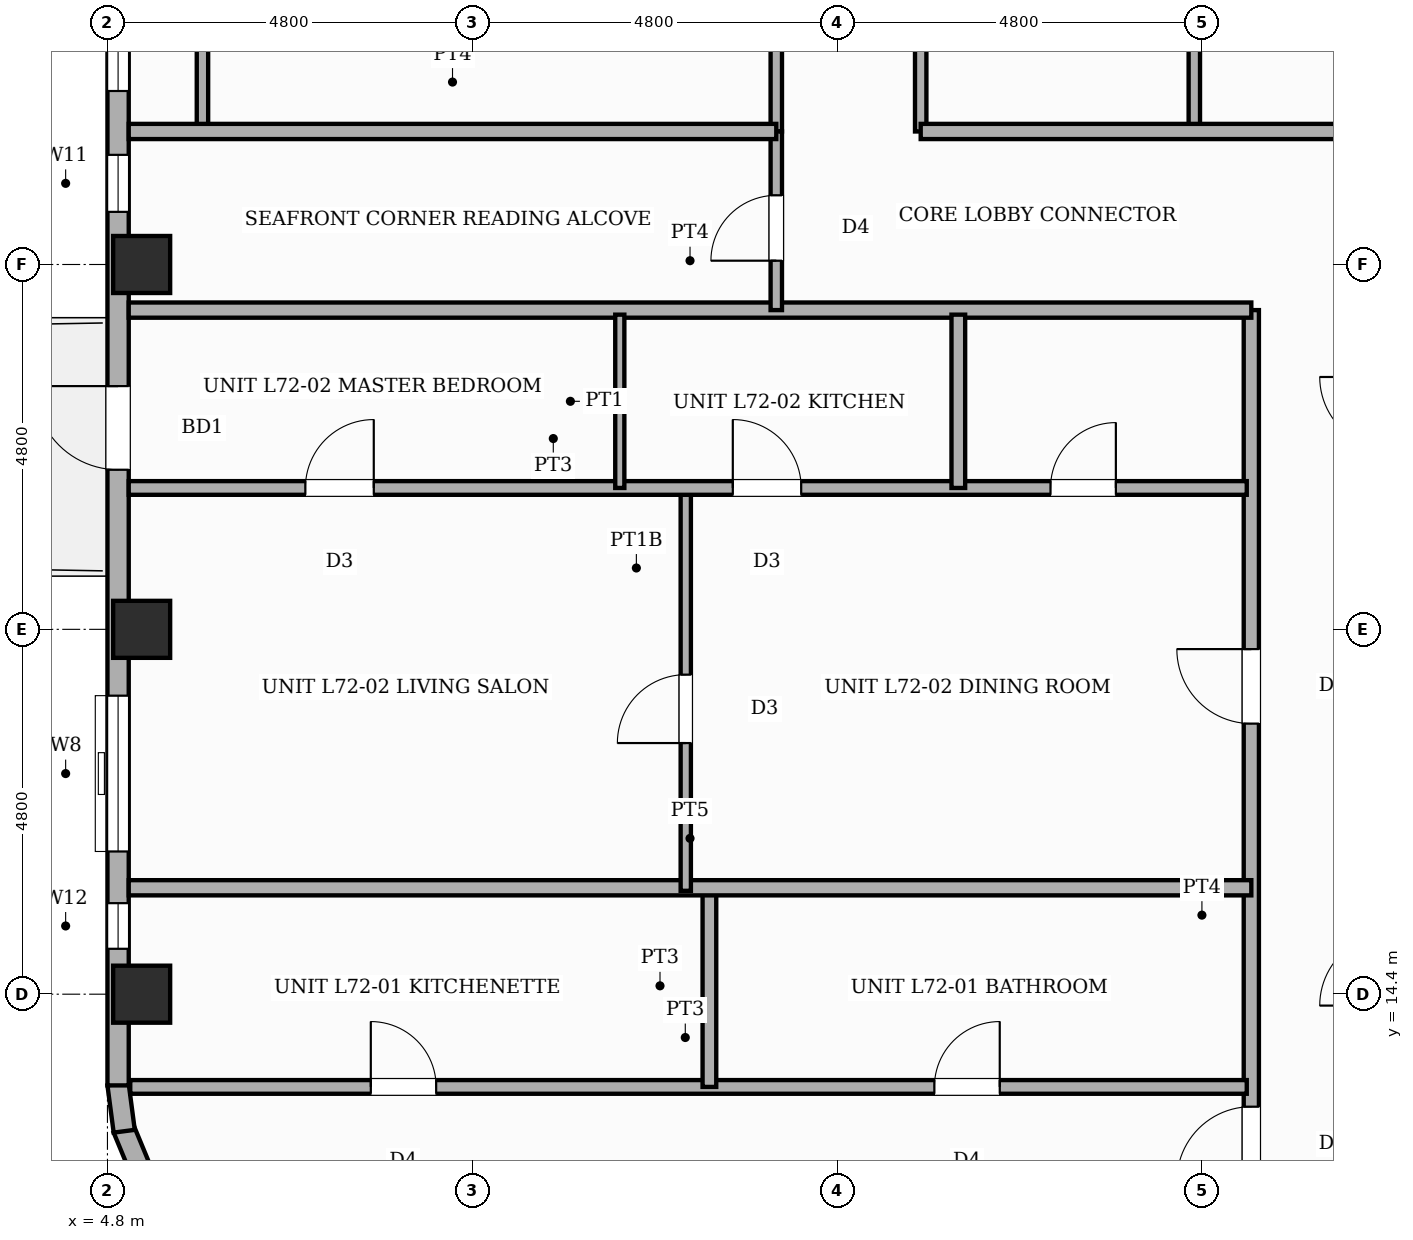
"""IFC4 building model, lengths in metres.
Left out: names, types, materials, properties, quantities, classifications, styles, units other than length and angle.
Written with IfcOpenShell. Run it as: python <this file> out.ifc"""

import sys

from ifc_helpers import new_model, si_unit, direction, frame, frame_2d, origin, origin_2d, place, context, subcontext, project, spatial, rectangle, extrude, element, fill, save


model = new_model("IFC4")
c1 = context("Model", 3, precision=1e-05, world=origin(), true_north=direction((0.0, 1.0)))
c2 = subcontext(c1, "Body", "Model", "MODEL_VIEW")
j1 = project(units=[si_unit("LENGTHUNIT", "METRE"), si_unit("PLANEANGLEUNIT", "RADIAN")], contexts=[c1])
p1 = place(None, origin())
s1 = spatial("IfcSite", under=j1, at=p1, CompositionType="ELEMENT")
p2 = place(p1, origin())
s2 = spatial("IfcBuilding", under=s1, at=p2, CompositionType="ELEMENT")
p3 = place(p2, frame((0.0, 0.0, 278.5)))
s3 = spatial("IfcBuildingStorey", under=s2, at=p3, CompositionType="ELEMENT", Elevation=278.5)
for number, where, z_axis, x_axis in (
    (1, (5.25, 14.4, 0.0), (0.0, 0.0, 1.0), (1.0, 0.0, 0.0)),
    (2, (5.25, 19.2, 0.0), (0.0, 0.0, 1.0), (1.0, 0.0, 0.0)),
    (3, (5.25, 24.0, 0.0), (0.0, 0.0, 1.0), (1.0, 0.0, 0.0)),
):
    element("IfcColumn", number, at=place(p3, frame(where, z_axis=z_axis, x_axis=x_axis)), inside=s3, PredefinedType="COLUMN", context=c2, shape_type="SweptSolid", body=[
        extrude(rectangle(XDim=0.75, YDim=0.75, at=origin_2d()), origin(), (0.0, 0.0, 1.0), 4.3),
    ])
p4 = place(p3, frame((5.251, 12.054, 0.0), z_axis=(0.0, 0.0, 1.0), x_axis=(-0.382787856107, 0.923836271867, 0.0)))
e4 = element("IfcWall", 4, at=p4, inside=s3, PredefinedType="STANDARD", context=c2, shape_type="SweptSolid", body=[
    extrude(rectangle(XDim=0.626, YDim=0.28, at=frame_2d((0.313, 0.0))), origin(), (0.0, 0.0, 1.0), 4.04),
])
p5 = place(p3, frame((5.021, 12.597, 0.0), z_axis=(0.0, 0.0, 1.0), x_axis=(-0.130555323746, 0.9914410257, 0.0)))
e5 = element("IfcWall", 5, at=p5, inside=s3, PredefinedType="STANDARD", context=c2, shape_type="SweptSolid", body=[
    extrude(rectangle(XDim=0.626, YDim=0.28, at=frame_2d((0.313, 0.0))), origin(), (0.0, 0.0, 1.0), 4.04),
])
p6 = place(p3, frame((4.94, 13.2, 0.0), z_axis=(0.0, 0.0, 1.0), x_axis=(0.0, 1.0, 0.0)))
e6 = element("IfcWall", 6, at=p6, inside=s3, PredefinedType="STANDARD", context=c2, shape_type="SweptSolid", body=[
    extrude(rectangle(XDim=32.4, YDim=0.28, at=frame_2d((16.2, 0.0))), origin(), (0.0, 0.0, 1.0), 3.32),
])
p7 = place(p6, frame((8.1, 0.0, 0.0)))
e7 = element("IfcOpeningElement", 7, at=p7, cuts=e6, PredefinedType="OPENING", context=c2, shape_type="SweptSolid", body=[
    extrude(rectangle(XDim=1.1, YDim=2.15, at=frame_2d((0.55, 1.075))), frame((0.0, 0.15, 0.0), z_axis=(0.0, -1.0, 0.0), x_axis=(1.0, 0.0, 0.0)), (0.0, 0.0, 1.0), 0.3),
])
p8 = place(p6, frame((1.798, 0.0, 0.45)))
e8 = element("IfcOpeningElement", 8, at=p8, cuts=e6, PredefinedType="OPENING", context=c2, shape_type="SweptSolid", body=[
    extrude(rectangle(XDim=0.6, YDim=1.8, at=frame_2d((0.3, 0.9))), frame((0.0, 0.15, 0.0), z_axis=(0.0, -1.0, 0.0), x_axis=(1.0, 0.0, 0.0)), (0.0, 0.0, 1.0), 0.3),
])
p9 = place(p6, frame((3.077, 0.0, 0.8)))
e9 = element("IfcOpeningElement", 9, at=p9, cuts=e6, PredefinedType="OPENING", context=c2, shape_type="SweptSolid", body=[
    extrude(rectangle(XDim=2.05, YDim=1.95, at=frame_2d((1.025, 0.975))), frame((0.0, 0.15, 0.0), z_axis=(0.0, -1.0, 0.0), x_axis=(1.0, 0.0, 0.0)), (0.0, 0.0, 1.0), 0.3),
])
p10 = place(p6, frame((13.083, 0.0, 0.8)))
e10 = element("IfcOpeningElement", 10, at=p10, cuts=e6, PredefinedType="OPENING", context=c2, shape_type="SweptSolid", body=[
    extrude(rectangle(XDim=2.05, YDim=1.95, at=frame_2d((1.025, 0.975))), frame((0.0, 0.15, 0.0), z_axis=(0.0, -1.0, 0.0), x_axis=(1.0, 0.0, 0.0)), (0.0, 0.0, 1.0), 0.3),
])
p11 = place(p6, frame((11.492, 0.0, 0.45)))
e11 = element("IfcOpeningElement", 11, at=p11, cuts=e6, PredefinedType="OPENING", context=c2, shape_type="SweptSolid", body=[
    extrude(rectangle(XDim=0.75, YDim=1.8, at=frame_2d((0.375, 0.9))), frame((0.0, 0.15, 0.0), z_axis=(0.0, -1.0, 0.0), x_axis=(1.0, 0.0, 0.0)), (0.0, 0.0, 1.0), 0.3),
])
p12 = place(p3, frame((13.6, 25.75, 0.0), z_axis=(0.0, 0.0, 1.0), x_axis=(0.0, 1.0, 0.0)))
e12 = element("IfcWall", 12, at=p12, inside=s3, PredefinedType="PARTITIONING", context=c2, shape_type="SweptSolid", body=[
    extrude(rectangle(XDim=5.15, YDim=0.15, at=frame_2d((2.575, 0.0))), origin(), (0.0, 0.0, 1.0), 4.04),
])
p13 = place(p12, frame((1.1, 0.0, 0.0)))
e13 = element("IfcOpeningElement", 13, at=p13, cuts=e12, PredefinedType="OPENING", context=c2, shape_type="SweptSolid", body=[
    extrude(rectangle(XDim=0.95, YDim=2.15, at=frame_2d((0.475, 1.075))), frame((0.0, 0.085, 0.0), z_axis=(0.0, -1.0, 0.0), x_axis=(1.0, 0.0, 0.0)), (0.0, 0.0, 1.0), 0.17),
])
p14 = place(p3, frame((15.5, 25.75, 0.0), z_axis=(0.0, 0.0, 1.0), x_axis=(0.0, 1.0, 0.0)))
e14 = element("IfcWall", 14, at=p14, inside=s3, PredefinedType="PARTITIONING", context=c2, shape_type="SweptSolid", body=[
    extrude(rectangle(XDim=5.15, YDim=0.15, at=frame_2d((2.575, 0.0))), origin(), (0.0, 0.0, 1.0), 4.04),
])
p15 = place(p14, frame((1.1, 0.0, 0.0)))
e15 = element("IfcOpeningElement", 15, at=p15, cuts=e14, PredefinedType="OPENING", context=c2, shape_type="SweptSolid", body=[
    extrude(rectangle(XDim=0.95, YDim=2.15, at=frame_2d((0.475, 1.075))), frame((0.0, 0.085, 0.0), z_axis=(0.0, -1.0, 0.0), x_axis=(1.0, 0.0, 0.0)), (0.0, 0.0, 1.0), 0.17),
])
p16 = place(p3, frame((6.05, 25.75, 0.0), z_axis=(0.0, 0.0, 1.0), x_axis=(0.0, 1.0, 0.0)))
e16 = element("IfcWall", 16, at=p16, inside=s3, PredefinedType="PARTITIONING", context=c2, shape_type="SweptSolid", body=[
    extrude(rectangle(XDim=5.15, YDim=0.15, at=frame_2d((2.575, 0.0))), origin(), (0.0, 0.0, 1.0), 4.04),
])
p17 = place(p3, frame((19.1, 25.75, 0.0), z_axis=(0.0, 0.0, 1.0), x_axis=(0.0, 1.0, 0.0)))
e17 = element("IfcWall", 17, at=p17, inside=s3, PredefinedType="PARTITIONING", context=c2, shape_type="SweptSolid", body=[
    extrude(rectangle(XDim=5.15, YDim=0.15, at=frame_2d((2.575, 0.0))), origin(), (0.0, 0.0, 1.0), 4.04),
])
p18 = place(p17, frame((1.2, 0.0, 0.0)))
e18 = element("IfcOpeningElement", 18, at=p18, cuts=e17, PredefinedType="OPENING", context=c2, shape_type="SweptSolid", body=[
    extrude(rectangle(XDim=0.95, YDim=2.15, at=frame_2d((0.475, 1.075))), frame((0.0, 0.085, 0.0), z_axis=(0.0, -1.0, 0.0), x_axis=(1.0, 0.0, 0.0)), (0.0, 0.0, 1.0), 0.17),
])
p19 = place(p3, frame((19.85, 11.08, 0.0), z_axis=(0.0, 0.0, 1.0), x_axis=(0.0, 1.0, 0.0)))
e19 = element("IfcWall", 19, at=p19, inside=s3, PredefinedType="PARTITIONING", context=c2, shape_type="SweptSolid", body=[
    extrude(rectangle(XDim=12.32, YDim=0.2, at=frame_2d((6.16, 0.0))), origin(), (0.0, 0.0, 1.0), 4.04),
])
p20 = place(p19, frame((0.86, 0.0, 0.0)))
e20 = element("IfcOpeningElement", 20, at=p20, cuts=e19, PredefinedType="OPENING", context=c2, shape_type="SweptSolid", body=[
    extrude(rectangle(XDim=0.98, YDim=2.18, at=frame_2d((0.49, 1.09))), frame((0.0, 0.11, 0.0), z_axis=(0.0, -1.0, 0.0), x_axis=(1.0, 0.0, 0.0)), (0.0, 0.0, 1.0), 0.22),
])
p21 = place(p19, frame((6.88, 0.0, 0.0)))
e21 = element("IfcOpeningElement", 21, at=p21, cuts=e19, PredefinedType="OPENING", context=c2, shape_type="SweptSolid", body=[
    extrude(rectangle(XDim=0.98, YDim=2.18, at=frame_2d((0.49, 1.09))), frame((0.0, 0.11, 0.0), z_axis=(0.0, -1.0, 0.0), x_axis=(1.0, 0.0, 0.0)), (0.0, 0.0, 1.0), 0.22),
])
p22 = place(p3, frame((5.08, 23.4, 0.0), z_axis=(0.0, 0.0, 1.0), x_axis=(1.0, 0.0, 0.0)))
e22 = element("IfcWall", 22, at=p22, inside=s3, PredefinedType="PARTITIONING", context=c2, shape_type="SweptSolid", body=[
    extrude(rectangle(XDim=14.77, YDim=0.2, at=frame_2d((7.385, 0.0))), origin(), (0.0, 0.0, 1.0), 4.04),
])
p23 = place(p3, frame((15.5, 25.75, 0.0), z_axis=(0.0, 0.0, 1.0), x_axis=(1.0, 0.0, 0.0)))
e23 = element("IfcWall", 23, at=p23, inside=s3, PredefinedType="PARTITIONING", context=c2, shape_type="SweptSolid", body=[
    extrude(rectangle(XDim=8.22, YDim=0.2, at=frame_2d((4.11, 0.0))), origin(), (0.0, 0.0, 1.0), 4.04),
])
p24 = place(p3, frame((13.6, 23.4, 0.0), z_axis=(0.0, 0.0, 1.0), x_axis=(0.0, 1.0, 0.0)))
e24 = element("IfcWall", 24, at=p24, inside=s3, PredefinedType="PARTITIONING", context=c2, shape_type="SweptSolid", body=[
    extrude(rectangle(XDim=2.35, YDim=0.15, at=frame_2d((1.175, 0.0))), origin(), (0.0, 0.0, 1.0), 4.04),
])
p25 = place(p24, frame((0.65, 0.0, 0.0)))
e25 = element("IfcOpeningElement", 25, at=p25, cuts=e24, PredefinedType="OPENING", context=c2, shape_type="SweptSolid", body=[
    extrude(rectangle(XDim=0.86, YDim=2.1, at=frame_2d((0.43, 1.05))), frame((0.0, 0.085, 0.0), z_axis=(0.0, -1.0, 0.0), x_axis=(1.0, 0.0, 0.0)), (0.0, 0.0, 1.0), 0.17),
])
p26 = place(p3, frame((5.08, 25.75, 0.0), z_axis=(0.0, 0.0, 1.0), x_axis=(1.0, 0.0, 0.0)))
e26 = element("IfcWall", 26, at=p26, inside=s3, PredefinedType="PARTITIONING", context=c2, shape_type="SweptSolid", body=[
    extrude(rectangle(XDim=8.52, YDim=0.2, at=frame_2d((4.26, 0.0))), origin(), (0.0, 0.0, 1.0), 4.04),
])
p27 = place(p3, frame((5.1, 13.18, 0.0), z_axis=(0.0, 0.0, 1.0), x_axis=(1.0, 0.0, 0.0)))
e27 = element("IfcWall", 27, at=p27, inside=s3, PredefinedType="PLUMBINGWALL", context=c2, shape_type="SweptSolid", body=[
    extrude(rectangle(XDim=14.69, YDim=0.18, at=frame_2d((7.345, 0.0))), origin(), (0.0, 0.0, 1.0), 4.04),
])
p28 = place(p27, frame((3.165, 0.0, 0.0)))
e28 = element("IfcOpeningElement", 28, at=p28, cuts=e27, PredefinedType="OPENING", context=c2, shape_type="SweptSolid", body=[
    extrude(rectangle(XDim=0.86, YDim=2.1, at=frame_2d((0.43, 1.05))), frame((0.0, 0.1, 0.0), z_axis=(0.0, -1.0, 0.0), x_axis=(1.0, 0.0, 0.0)), (0.0, 0.0, 1.0), 0.2),
])
p29 = place(p27, frame((10.58, 0.0, 0.0)))
e29 = element("IfcOpeningElement", 29, at=p29, cuts=e27, PredefinedType="OPENING", context=c2, shape_type="SweptSolid", body=[
    extrude(rectangle(XDim=0.86, YDim=2.1, at=frame_2d((0.43, 1.05))), frame((0.0, 0.1, 0.0), z_axis=(0.0, -1.0, 0.0), x_axis=(1.0, 0.0, 0.0)), (0.0, 0.0, 1.0), 0.2),
])
p30 = place(p3, frame((12.72, 13.18, 0.0), z_axis=(0.0, 0.0, 1.0), x_axis=(0.0, 1.0, 0.0)))
e30 = element("IfcWall", 30, at=p30, inside=s3, PredefinedType="PLUMBINGWALL", context=c2, shape_type="SweptSolid", body=[
    extrude(rectangle(XDim=2.66, YDim=0.18, at=frame_2d((1.33, 0.0))), origin(), (0.0, 0.0, 1.0), 4.04),
])
p31 = place(p3, frame((5.08, 15.8, 0.0), z_axis=(0.0, 0.0, 1.0), x_axis=(1.0, 0.0, 0.0)))
e31 = element("IfcWall", 31, at=p31, inside=s3, PredefinedType="SOLIDWALL", context=c2, shape_type="SweptSolid", body=[
    extrude(rectangle(XDim=14.77, YDim=0.2, at=frame_2d((7.385, 0.0))), origin(), (0.0, 0.0, 1.0), 4.04),
])
p32 = place(p3, frame((12.409, 15.76, 0.0), z_axis=(0.0, 0.0, 1.0), x_axis=(0.0, 1.0, 0.0)))
e32 = element("IfcWall", 32, at=p32, inside=s3, PredefinedType="PARTITIONING", context=c2, shape_type="SweptSolid", body=[
    extrude(rectangle(XDim=5.3, YDim=0.135, at=frame_2d((2.65, 0.0))), origin(), (0.0, 0.0, 1.0), 4.04),
])
p33 = place(p32, frame((1.944, 0.0, 0.0)))
e33 = element("IfcOpeningElement", 33, at=p33, cuts=e32, PredefinedType="OPENING", context=c2, shape_type="SweptSolid", body=[
    extrude(rectangle(XDim=0.9, YDim=2.15, at=frame_2d((0.45, 1.075))), frame((0.0, 0.078, 0.0), z_axis=(0.0, -1.0, 0.0), x_axis=(1.0, 0.0, 0.0)), (0.0, 0.0, 1.0), 0.155),
])
p34 = place(p3, frame((5.08, 21.06, 0.0), z_axis=(0.0, 0.0, 1.0), x_axis=(1.0, 0.0, 0.0)))
e34 = element("IfcWall", 34, at=p34, inside=s3, PredefinedType="PLUMBINGWALL", context=c2, shape_type="SweptSolid", body=[
    extrude(rectangle(XDim=14.71, YDim=0.18, at=frame_2d((7.355, 0.0))), origin(), (0.0, 0.0, 1.0), 4.04),
])
p35 = place(p34, frame((2.324, 0.0, 0.0)))
e35 = element("IfcOpeningElement", 35, at=p35, cuts=e34, PredefinedType="OPENING", context=c2, shape_type="SweptSolid", body=[
    extrude(rectangle(XDim=0.9, YDim=2.15, at=frame_2d((0.45, 1.075))), frame((0.0, 0.1, 0.0), z_axis=(0.0, -1.0, 0.0), x_axis=(1.0, 0.0, 0.0)), (0.0, 0.0, 1.0), 0.2),
])
p36 = place(p34, frame((7.948, 0.0, 0.0)))
e36 = element("IfcOpeningElement", 36, at=p36, cuts=e34, PredefinedType="OPENING", context=c2, shape_type="SweptSolid", body=[
    extrude(rectangle(XDim=0.9, YDim=2.15, at=frame_2d((0.45, 1.075))), frame((0.0, 0.1, 0.0), z_axis=(0.0, -1.0, 0.0), x_axis=(1.0, 0.0, 0.0)), (0.0, 0.0, 1.0), 0.2),
])
p37 = place(p34, frame((12.128, 0.0, 0.0)))
e37 = element("IfcOpeningElement", 37, at=p37, cuts=e34, PredefinedType="OPENING", context=c2, shape_type="SweptSolid", body=[
    extrude(rectangle(XDim=0.86, YDim=2.1, at=frame_2d((0.43, 1.05))), frame((0.0, 0.1, 0.0), z_axis=(0.0, -1.0, 0.0), x_axis=(1.0, 0.0, 0.0)), (0.0, 0.0, 1.0), 0.2),
])
p38 = place(p3, frame((11.541, 21.06, 0.0), z_axis=(0.0, 0.0, 1.0), x_axis=(0.0, 1.0, 0.0)))
e38 = element("IfcWall", 38, at=p38, inside=s3, PredefinedType="PARTITIONING", context=c2, shape_type="SweptSolid", body=[
    extrude(rectangle(XDim=2.28, YDim=0.12, at=frame_2d((1.14, 0.0))), origin(), (0.0, 0.0, 1.0), 4.04),
])
p39 = place(p3, frame((15.995, 21.06, 0.0), z_axis=(0.0, 0.0, 1.0), x_axis=(0.0, 1.0, 0.0)))
e39 = element("IfcWall", 39, at=p39, inside=s3, PredefinedType="PLUMBINGWALL", context=c2, shape_type="SweptSolid", body=[
    extrude(rectangle(XDim=2.28, YDim=0.18, at=frame_2d((1.14, 0.0))), origin(), (0.0, 0.0, 1.0), 4.04),
])
p40 = place(p7, origin())
e40 = element("IfcDoor", 40, at=p40, inside=s3, OperationType="SINGLE_SWING_RIGHT", PredefinedType="DOOR", context=c2, shape_type="SweptSolid", body=[
    extrude(rectangle(XDim=1.1, YDim=2.15, at=frame_2d((0.55, 1.075))), frame((0.0, 0.025, 0.0), z_axis=(0.0, -1.0, 0.0), x_axis=(1.0, 0.0, 0.0)), (0.0, 0.0, 1.0), 0.05),
])
fill(e7, e40)
p41 = place(p8, origin())
e41 = element("IfcWindow", 41, at=p41, inside=s3, PartitioningType="SINGLE_PANEL", PredefinedType="WINDOW", context=c2, shape_type="SweptSolid", body=[
    extrude(rectangle(XDim=0.6, YDim=1.8, at=frame_2d((0.3, 0.9))), frame((0.0, 0.03, 0.0), z_axis=(0.0, -1.0, 0.0), x_axis=(1.0, 0.0, 0.0)), (0.0, 0.0, 1.0), 0.06),
])
fill(e8, e41)
p42 = place(p9, origin())
e42 = element("IfcWindow", 42, at=p42, inside=s3, PartitioningType="SINGLE_PANEL", PredefinedType="WINDOW", context=c2, shape_type="SweptSolid", body=[
    extrude(rectangle(XDim=2.05, YDim=1.95, at=frame_2d((1.025, 0.975))), frame((0.0, 0.03, 0.0), z_axis=(0.0, -1.0, 0.0), x_axis=(1.0, 0.0, 0.0)), (0.0, 0.0, 1.0), 0.06),
])
fill(e9, e42)
p43 = place(p10, origin())
e43 = element("IfcWindow", 43, at=p43, inside=s3, PartitioningType="SINGLE_PANEL", PredefinedType="WINDOW", context=c2, shape_type="SweptSolid", body=[
    extrude(rectangle(XDim=2.05, YDim=1.95, at=frame_2d((1.025, 0.975))), frame((0.0, 0.03, 0.0), z_axis=(0.0, -1.0, 0.0), x_axis=(1.0, 0.0, 0.0)), (0.0, 0.0, 1.0), 0.06),
])
fill(e10, e43)
p44 = place(p11, origin())
e44 = element("IfcWindow", 44, at=p44, inside=s3, PartitioningType="SINGLE_PANEL", PredefinedType="WINDOW", context=c2, shape_type="SweptSolid", body=[
    extrude(rectangle(XDim=0.75, YDim=1.8, at=frame_2d((0.375, 0.9))), frame((0.0, 0.03, 0.0), z_axis=(0.0, -1.0, 0.0), x_axis=(1.0, 0.0, 0.0)), (0.0, 0.0, 1.0), 0.06),
])
fill(e11, e44)
p45 = place(p25, origin())
e45 = element("IfcDoor", 45, at=p45, inside=s3, OperationType="SINGLE_SWING_LEFT", PredefinedType="DOOR", context=c2, shape_type="SweptSolid", body=[
    extrude(rectangle(XDim=0.86, YDim=2.1, at=frame_2d((0.43, 1.05))), frame((0.0, 0.025, 0.0), z_axis=(0.0, -1.0, 0.0), x_axis=(1.0, 0.0, 0.0)), (0.0, 0.0, 1.0), 0.05),
])
fill(e25, e45)
p46 = place(p20, origin())
e46 = element("IfcDoor", 46, at=p46, inside=s3, OperationType="SINGLE_SWING_LEFT", PredefinedType="DOOR", context=c2, shape_type="SweptSolid", body=[
    extrude(rectangle(XDim=0.98, YDim=2.18, at=frame_2d((0.49, 1.09))), frame((0.0, 0.025, 0.0), z_axis=(0.0, -1.0, 0.0), x_axis=(1.0, 0.0, 0.0)), (0.0, 0.0, 1.0), 0.05),
])
fill(e20, e46)
p47 = place(p28, origin())
e47 = element("IfcDoor", 47, at=p47, inside=s3, OperationType="SINGLE_SWING_LEFT", PredefinedType="DOOR", context=c2, shape_type="SweptSolid", body=[
    extrude(rectangle(XDim=0.86, YDim=2.1, at=frame_2d((0.43, 1.05))), frame((0.0, 0.025, 0.0), z_axis=(0.0, -1.0, 0.0), x_axis=(1.0, 0.0, 0.0)), (0.0, 0.0, 1.0), 0.05),
])
fill(e28, e47)
p48 = place(p29, origin())
e48 = element("IfcDoor", 48, at=p48, inside=s3, OperationType="SINGLE_SWING_RIGHT", PredefinedType="DOOR", context=c2, shape_type="SweptSolid", body=[
    extrude(rectangle(XDim=0.86, YDim=2.1, at=frame_2d((0.43, 1.05))), frame((0.0, 0.025, 0.0), z_axis=(0.0, -1.0, 0.0), x_axis=(1.0, 0.0, 0.0)), (0.0, 0.0, 1.0), 0.05),
])
fill(e29, e48)
p49 = place(p21, origin())
e49 = element("IfcDoor", 49, at=p49, inside=s3, OperationType="SINGLE_SWING_RIGHT", PredefinedType="DOOR", context=c2, shape_type="SweptSolid", body=[
    extrude(rectangle(XDim=0.98, YDim=2.18, at=frame_2d((0.49, 1.09))), frame((0.0, 0.025, 0.0), z_axis=(0.0, -1.0, 0.0), x_axis=(1.0, 0.0, 0.0)), (0.0, 0.0, 1.0), 0.05),
])
fill(e21, e49)
p50 = place(p33, origin())
e50 = element("IfcDoor", 50, at=p50, inside=s3, OperationType="SINGLE_SWING_LEFT", PredefinedType="DOOR", context=c2, shape_type="SweptSolid", body=[
    extrude(rectangle(XDim=0.9, YDim=2.15, at=frame_2d((0.45, 1.075))), frame((0.0, 0.025, 0.0), z_axis=(0.0, -1.0, 0.0), x_axis=(1.0, 0.0, 0.0)), (0.0, 0.0, 1.0), 0.05),
])
fill(e33, e50)
p51 = place(p35, origin())
e51 = element("IfcDoor", 51, at=p51, inside=s3, OperationType="SINGLE_SWING_RIGHT", PredefinedType="DOOR", context=c2, shape_type="SweptSolid", body=[
    extrude(rectangle(XDim=0.9, YDim=2.15, at=frame_2d((0.45, 1.075))), frame((0.0, 0.025, 0.0), z_axis=(0.0, -1.0, 0.0), x_axis=(1.0, 0.0, 0.0)), (0.0, 0.0, 1.0), 0.05),
])
fill(e35, e51)
p52 = place(p36, origin())
e52 = element("IfcDoor", 52, at=p52, inside=s3, OperationType="SINGLE_SWING_LEFT", PredefinedType="DOOR", context=c2, shape_type="SweptSolid", body=[
    extrude(rectangle(XDim=0.9, YDim=2.15, at=frame_2d((0.45, 1.075))), frame((0.0, 0.025, 0.0), z_axis=(0.0, -1.0, 0.0), x_axis=(1.0, 0.0, 0.0)), (0.0, 0.0, 1.0), 0.05),
])
fill(e36, e52)
p53 = place(p37, origin())
e53 = element("IfcDoor", 53, at=p53, inside=s3, OperationType="SINGLE_SWING_RIGHT", PredefinedType="DOOR", context=c2, shape_type="SweptSolid", body=[
    extrude(rectangle(XDim=0.86, YDim=2.1, at=frame_2d((0.43, 1.05))), frame((0.0, 0.025, 0.0), z_axis=(0.0, -1.0, 0.0), x_axis=(1.0, 0.0, 0.0)), (0.0, 0.0, 1.0), 0.05),
])
fill(e37, e53)
save(model, sys.argv[1])
